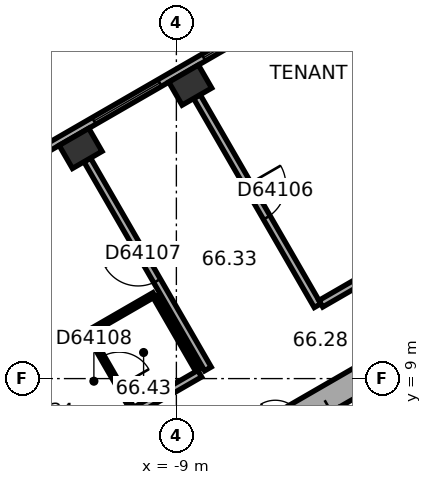
"""IFC4 building model, lengths in metres.
Left out: names, types, materials, properties, quantities, classifications, styles, units other than length and angle.
Written with IfcOpenShell. Run it as: python <this file> out.ifc"""

import sys

from ifc_helpers import new_model, si_unit, direction, frame, frame_2d, origin, origin_2d, place, context, subcontext, project, spatial, rectangle, extrude, element, fill, save


model = new_model("IFC4")
c1 = context("Model", 3, precision=1e-05, world=origin(), true_north=direction((0.0, 1.0)))
c2 = subcontext(c1, "Body", "Model", "MODEL_VIEW")
j1 = project(units=[si_unit("LENGTHUNIT", "METRE"), si_unit("PLANEANGLEUNIT", "RADIAN")], contexts=[c1])
p1 = place(None, origin())
s1 = spatial("IfcSite", under=j1, at=p1, CompositionType="ELEMENT")
p2 = place(p1, origin())
s2 = spatial("IfcBuilding", under=s1, at=p2, CompositionType="ELEMENT")
p3 = place(p2, frame((0.0, 0.0, 267.2)))
s3 = spatial("IfcBuildingStorey", under=s2, at=p3, CompositionType="ELEMENT", Elevation=267.2)
for number, where, z_axis, x_axis in (
    (1, (-8.635, 16.723, 0.0), (0.0, 0.0, 1.0), (-0.866, -0.5, 0.0)),
    (2, (-11.52, 15.057, 0.0), (0.0, 0.0, 1.0), (-0.866, -0.5, 0.0)),
):
    element("IfcColumn", number, at=place(p3, frame(where, z_axis=z_axis, x_axis=x_axis)), inside=s3, PredefinedType="COLUMN", context=c2, shape_type="SweptSolid", body=[
        extrude(rectangle(XDim=0.9, YDim=0.7, at=origin_2d()), origin(), (0.0, 0.0, 1.0), 3.7),
    ])
p4 = place(p3, frame((0.175, 11.475, 0.0), z_axis=(0.0, 0.0, 1.0), x_axis=(-0.866026453023, -0.499998182661, 0.0)))
e3 = element("IfcWall", 3, at=p4, inside=s3, PredefinedType="SHEAR", context=c2, shape_type="SweptSolid", body=[
    extrude(rectangle(XDim=11.778, YDim=0.7, at=frame_2d((5.889, 0.0))), origin(), (0.0, 0.0, 1.0), 3.7),
])
p5 = place(p4, frame((6.089, 0.0, 0.0)))
e4 = element("IfcOpeningElement", 4, at=p5, cuts=e3, PredefinedType="OPENING", context=c2, shape_type="SweptSolid", body=[
    extrude(rectangle(XDim=1.5, YDim=2.1, at=frame_2d((0.75, 1.05))), frame((0.0, 0.36, 0.0), z_axis=(0.0, -1.0, 0.0), x_axis=(1.0, 0.0, 0.0)), (0.0, 0.0, 1.0), 0.72),
])
p6 = place(p4, frame((2.939, 0.0, 0.0)))
e5 = element("IfcOpeningElement", 5, at=p6, cuts=e3, PredefinedType="OPENING", context=c2, shape_type="SweptSolid", body=[
    extrude(rectangle(XDim=0.9, YDim=2.1, at=frame_2d((0.45, 1.05))), frame((0.0, 0.36, 0.0), z_axis=(0.0, -1.0, 0.0), x_axis=(1.0, 0.0, 0.0)), (0.0, 0.0, 1.0), 0.72),
])
p7 = place(p3, frame((-2.624, 20.713, 0.0), z_axis=(0.0, 0.0, 1.0), x_axis=(-0.866026460444, -0.499998169808, 0.0)))
e6 = element("IfcWall", 6, at=p7, inside=s3, PredefinedType="STANDARD", context=c2, shape_type="SweptSolid", body=[
    extrude(rectangle(XDim=17.731, YDim=0.2, at=frame_2d((8.866, 0.0))), origin(), (0.0, 0.0, 1.0), 3.7),
])
p8 = place(p7, frame((1.203, 0.0, 0.9)))
e7 = element("IfcOpeningElement", 7, at=p8, cuts=e6, PredefinedType="OPENING", context=c2, shape_type="SweptSolid", body=[
    extrude(rectangle(XDim=2.0, YDim=2.0, at=frame_2d((1.0, 1.0))), frame((0.0, 0.11, 0.0), z_axis=(0.0, -1.0, 0.0), x_axis=(1.0, 0.0, 0.0)), (0.0, 0.0, 1.0), 0.22),
])
p9 = place(p7, frame((4.535, 0.0, 0.9)))
e8 = element("IfcOpeningElement", 8, at=p9, cuts=e6, PredefinedType="OPENING", context=c2, shape_type="SweptSolid", body=[
    extrude(rectangle(XDim=2.0, YDim=2.0, at=frame_2d((1.0, 1.0))), frame((0.0, 0.11, 0.0), z_axis=(0.0, -1.0, 0.0), x_axis=(1.0, 0.0, 0.0)), (0.0, 0.0, 1.0), 0.22),
])
p10 = place(p7, frame((7.867, 0.0, 0.9)))
e9 = element("IfcOpeningElement", 9, at=p10, cuts=e6, PredefinedType="OPENING", context=c2, shape_type="SweptSolid", body=[
    extrude(rectangle(XDim=2.0, YDim=2.0, at=frame_2d((1.0, 1.0))), frame((0.0, 0.11, 0.0), z_axis=(0.0, -1.0, 0.0), x_axis=(1.0, 0.0, 0.0)), (0.0, 0.0, 1.0), 0.22),
])
p11 = place(p7, frame((11.198, 0.0, 0.9)))
e10 = element("IfcOpeningElement", 10, at=p11, cuts=e6, PredefinedType="OPENING", context=c2, shape_type="SweptSolid", body=[
    extrude(rectangle(XDim=2.0, YDim=2.0, at=frame_2d((1.0, 1.0))), frame((0.0, 0.11, 0.0), z_axis=(0.0, -1.0, 0.0), x_axis=(1.0, 0.0, 0.0)), (0.0, 0.0, 1.0), 0.22),
])
p12 = place(p7, frame((14.53, 0.0, 0.9)))
e11 = element("IfcOpeningElement", 11, at=p12, cuts=e6, PredefinedType="OPENING", context=c2, shape_type="SweptSolid", body=[
    extrude(rectangle(XDim=2.0, YDim=2.0, at=frame_2d((1.0, 1.0))), frame((0.0, 0.11, 0.0), z_axis=(0.0, -1.0, 0.0), x_axis=(1.0, 0.0, 0.0)), (0.0, 0.0, 1.0), 0.22),
])
p13 = place(p3, frame((-11.345, 14.754, 0.0), z_axis=(0.0, 0.0, 1.0), x_axis=(0.500005339912, -0.866022320763, 0.0)))
e12 = element("IfcWall", 12, at=p13, inside=s3, PredefinedType="PARTITIONING", context=c2, shape_type="SweptSolid", body=[
    extrude(rectangle(XDim=6.35, YDim=0.2, at=frame_2d((3.175, 0.0))), origin(), (0.0, 0.0, 1.0), 3.42),
])
p14 = place(p13, frame((2.675, 0.0, 0.0)))
e13 = element("IfcOpeningElement", 13, at=p14, cuts=e12, PredefinedType="OPENING", context=c2, shape_type="SweptSolid", body=[
    extrude(rectangle(XDim=1.0, YDim=2.1, at=frame_2d((0.5, 1.05))), frame((0.0, 0.11, 0.0), z_axis=(0.0, -1.0, 0.0), x_axis=(1.0, 0.0, 0.0)), (0.0, 0.0, 1.0), 0.22),
])
p15 = place(p3, frame((-11.319, 10.208, 0.0), z_axis=(0.0, 0.0, 1.0), x_axis=(0.866010750942, 0.50002537861, 0.0)))
e14 = element("IfcWall", 14, at=p15, inside=s3, PredefinedType="PARTITIONING", context=c2, shape_type="SweptSolid", body=[
    extrude(rectangle(XDim=2.0, YDim=0.12, at=frame_2d((1.0, 0.0))), origin(), (0.0, 0.0, 1.0), 3.42),
])
p16 = place(p3, frame((-10.169, 8.216, 0.0), z_axis=(0.0, 0.0, 1.0), x_axis=(-0.500030632641, 0.866007717299, 0.0)))
e15 = element("IfcWall", 15, at=p16, inside=s3, PredefinedType="PARTITIONING", context=c2, shape_type="SweptSolid", body=[
    extrude(rectangle(XDim=2.24, YDim=0.12, at=frame_2d((1.12, 0.0))), origin(), (0.0, 0.0, 1.0), 3.42),
])
p17 = place(p16, frame((0.67, 0.0, 0.0)))
e16 = element("IfcOpeningElement", 16, at=p17, cuts=e15, PredefinedType="OPENING", context=c2, shape_type="SweptSolid", body=[
    extrude(rectangle(XDim=0.9, YDim=2.1, at=frame_2d((0.45, 1.05))), frame((0.0, 0.07, 0.0), z_axis=(0.0, -1.0, 0.0), x_axis=(1.0, 0.0, 0.0)), (0.0, 0.0, 1.0), 0.14),
])
p18 = place(p3, frame((-9.557, 11.156, 0.0), z_axis=(0.0, 0.0, 1.0), x_axis=(0.49994888933, -0.866054910533, 0.0)))
e17 = element("IfcWall", 17, at=p18, inside=s3, PredefinedType="PARTITIONING", context=c2, shape_type="SweptSolid", body=[
    extrude(rectangle(XDim=2.24, YDim=0.12, at=frame_2d((1.12, 0.0))), origin(), (0.0, 0.0, 1.0), 3.42),
])
p19 = place(p3, frame((-8.46, 16.42, 0.0), z_axis=(0.0, 0.0, 1.0), x_axis=(0.500005339912, -0.866022320763, 0.0)))
e18 = element("IfcWall", 18, at=p19, inside=s3, PredefinedType="PARTITIONING", context=c2, shape_type="SweptSolid", body=[
    extrude(rectangle(XDim=6.35, YDim=0.2, at=frame_2d((3.175, 0.0))), origin(), (0.0, 0.0, 1.0), 2.87),
])
p20 = place(p19, frame((2.675, 0.0, 0.0)))
e19 = element("IfcOpeningElement", 19, at=p20, cuts=e18, PredefinedType="OPENING", context=c2, shape_type="SweptSolid", body=[
    extrude(rectangle(XDim=1.0, YDim=2.1, at=frame_2d((0.5, 1.05))), frame((0.0, 0.11, 0.0), z_axis=(0.0, -1.0, 0.0), x_axis=(1.0, 0.0, 0.0)), (0.0, 0.0, 1.0), 0.22),
])
p21 = place(p3, frame((-8.387, 9.13, 0.0), z_axis=(0.0, 0.0, 1.0), x_axis=(-0.866026878644, -0.499997445459, 0.0)))
e20 = element("IfcWall", 20, at=p21, inside=s3, PredefinedType="PARTITIONING", context=c2, shape_type="SweptSolid", body=[
    extrude(rectangle(XDim=3.151, YDim=0.2, at=frame_2d((1.575, 0.0))), origin(), (0.0, 0.0, 1.0), 3.42),
])
p22 = place(p3, frame((-0.95, 13.423, 0.0), z_axis=(0.0, 0.0, 1.0), x_axis=(-0.86603557629, -0.499982380289, 0.0)))
e21 = element("IfcWall", 21, at=p22, inside=s3, PredefinedType="PARTITIONING", context=c2, shape_type="SweptSolid", body=[
    extrude(rectangle(XDim=4.906, YDim=0.2, at=frame_2d((2.453, 0.0))), origin(), (0.0, 0.0, 1.0), 3.42),
])
p23 = place(p9, origin())
e22 = element("IfcWindow", 22, at=p23, inside=s3, PartitioningType="SINGLE_PANEL", PredefinedType="WINDOW", context=c2, shape_type="SweptSolid", body=[
    extrude(rectangle(XDim=2.0, YDim=2.0, at=frame_2d((1.0, 1.0))), frame((0.0, 0.03, 0.0), z_axis=(0.0, -1.0, 0.0), x_axis=(1.0, 0.0, 0.0)), (0.0, 0.0, 1.0), 0.06),
])
fill(e8, e22)
p24 = place(p10, origin())
e23 = element("IfcWindow", 23, at=p24, inside=s3, PartitioningType="SINGLE_PANEL", PredefinedType="WINDOW", context=c2, shape_type="SweptSolid", body=[
    extrude(rectangle(XDim=2.0, YDim=2.0, at=frame_2d((1.0, 1.0))), frame((0.0, 0.03, 0.0), z_axis=(0.0, -1.0, 0.0), x_axis=(1.0, 0.0, 0.0)), (0.0, 0.0, 1.0), 0.06),
])
fill(e9, e23)
p25 = place(p5, origin())
e24 = element("IfcDoor", 24, at=p25, inside=s3, OperationType="DOUBLE_DOOR_SINGLE_SWING", PredefinedType="DOOR", context=c2, shape_type="SweptSolid", body=[
    extrude(rectangle(XDim=1.5, YDim=2.1, at=frame_2d((0.75, 1.05))), frame((0.0, 0.025, 0.0), z_axis=(0.0, -1.0, 0.0), x_axis=(1.0, 0.0, 0.0)), (0.0, 0.0, 1.0), 0.05),
])
fill(e4, e24)
p26 = place(p20, origin())
e25 = element("IfcDoor", 25, at=p26, inside=s3, OperationType="SINGLE_SWING_LEFT", PredefinedType="DOOR", context=c2, shape_type="SweptSolid", body=[
    extrude(rectangle(XDim=1.0, YDim=2.1, at=frame_2d((0.5, 1.05))), frame((0.0, 0.025, 0.0), z_axis=(0.0, -1.0, 0.0), x_axis=(1.0, 0.0, 0.0)), (0.0, 0.0, 1.0), 0.05),
])
fill(e19, e25)
p27 = place(p14, origin())
e26 = element("IfcDoor", 26, at=p27, inside=s3, OperationType="SINGLE_SWING_LEFT", PredefinedType="DOOR", context=c2, shape_type="SweptSolid", body=[
    extrude(rectangle(XDim=1.0, YDim=2.1, at=frame_2d((0.5, 1.05))), frame((0.0, 0.025, 0.0), z_axis=(0.0, -1.0, 0.0), x_axis=(1.0, 0.0, 0.0)), (0.0, 0.0, 1.0), 0.05),
])
fill(e13, e26)
p28 = place(p17, origin())
e27 = element("IfcDoor", 27, at=p28, inside=s3, OperationType="SINGLE_SWING_LEFT", PredefinedType="DOOR", context=c2, shape_type="SweptSolid", body=[
    extrude(rectangle(XDim=0.9, YDim=2.1, at=frame_2d((0.45, 1.05))), frame((0.0, 0.025, 0.0), z_axis=(0.0, -1.0, 0.0), x_axis=(1.0, 0.0, 0.0)), (0.0, 0.0, 1.0), 0.05),
])
fill(e16, e27)
save(model, sys.argv[1])
